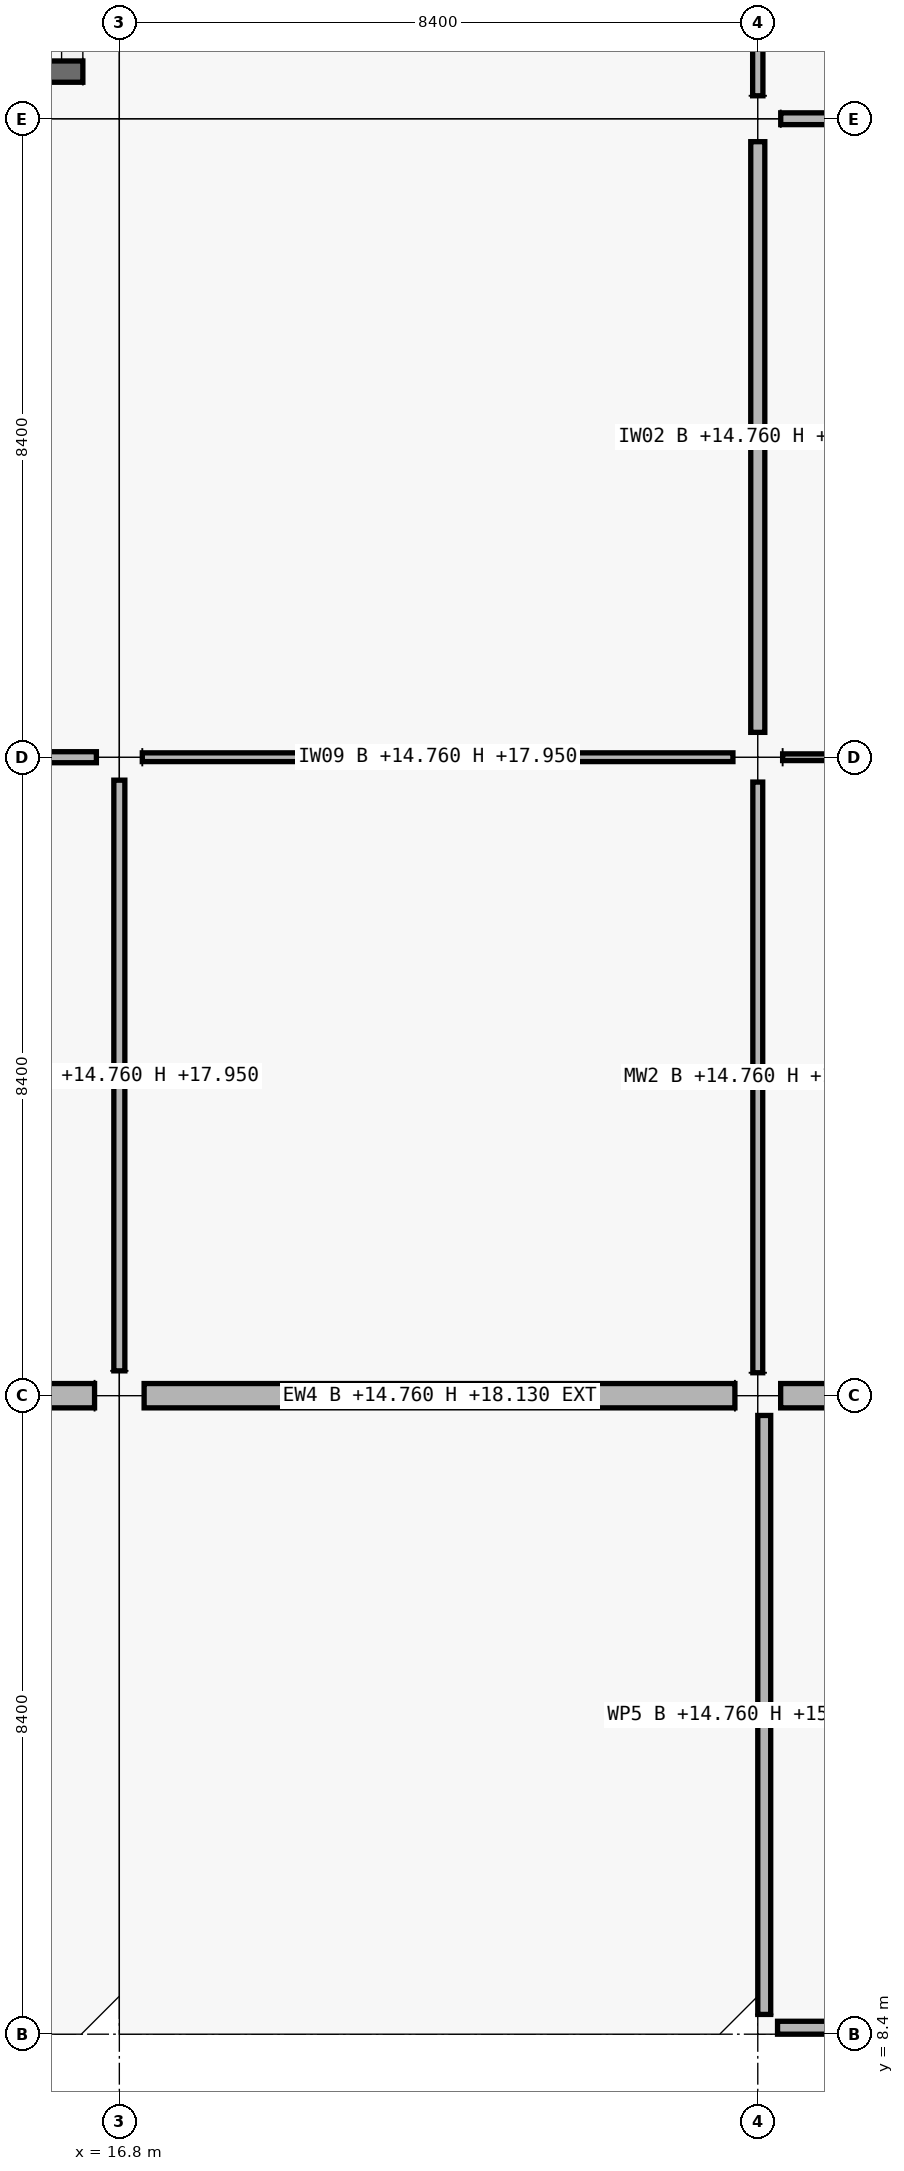
"""IFC4 building model, lengths in metres.
Left out: names, types, materials, properties, quantities, classifications, styles, units other than length and angle.
Written with IfcOpenShell. Run it as: python <this file> out.ifc"""

import sys

from ifc_helpers import new_model, si_unit, direction, frame, frame_2d, origin, origin_2d, place, context, subcontext, project, spatial, rectangle, extrude, element, fill, save


model = new_model("IFC4")
c1 = context("Model", 3, precision=1e-05, world=origin(), true_north=direction((0.0, 1.0)))
c2 = subcontext(c1, "Body", "Model", "MODEL_VIEW")
j1 = project(units=[si_unit("LENGTHUNIT", "METRE"), si_unit("PLANEANGLEUNIT", "RADIAN")], contexts=[c1])
p1 = place(None, origin())
s1 = spatial("IfcSite", under=j1, at=p1, CompositionType="ELEMENT")
p2 = place(p1, origin())
s2 = spatial("IfcBuilding", under=s1, at=p2, CompositionType="ELEMENT")
p3 = place(p2, frame((0.0, 0.0, 14.76)))
s3 = spatial("IfcBuildingStorey", under=s2, at=p3, CompositionType="ELEMENT", Elevation=14.76)
p4 = place(p3, frame((16.8, 16.8, 0.0), z_axis=(0.0, 0.0, 1.0), x_axis=(1.0, 0.0, 0.0)))
e1 = element("IfcColumn", 1, at=p4, inside=s3, PredefinedType="COLUMN", context=c2, shape_type="SweptSolid", body=[
    extrude(rectangle(XDim=0.65, YDim=0.65, at=origin_2d()), origin(), (0.0, 0.0, 1.0), 4.32),
])
p5 = place(p3, frame((16.8, 25.2, 0.0), z_axis=(0.0, 0.0, 1.0), x_axis=(1.0, 0.0, 0.0)))
e2 = element("IfcColumn", 2, at=p5, inside=s3, PredefinedType="COLUMN", context=c2, shape_type="SweptSolid", body=[
    extrude(rectangle(XDim=0.6, YDim=0.6, at=origin_2d()), origin(), (0.0, 0.0, 1.0), 4.32),
])
p6 = place(p3, frame((16.8, 33.6, 0.0), z_axis=(0.0, 0.0, 1.0), x_axis=(1.0, 0.0, 0.0)))
e3 = element("IfcColumn", 3, at=p6, inside=s3, PredefinedType="COLUMN", context=c2, shape_type="SweptSolid", body=[
    extrude(rectangle(XDim=0.65, YDim=0.65, at=origin_2d()), origin(), (0.0, 0.0, 1.0), 4.32),
])
p7 = place(p3, frame((25.2, 16.8, 0.0), z_axis=(0.0, 0.0, 1.0), x_axis=(1.0, 0.0, 0.0)))
e4 = element("IfcColumn", 4, at=p7, inside=s3, PredefinedType="COLUMN", context=c2, shape_type="SweptSolid", body=[
    extrude(rectangle(XDim=0.6, YDim=0.6, at=origin_2d()), origin(), (0.0, 0.0, 1.0), 4.32),
])
p8 = place(p3, frame((25.2, 25.2, 0.0), z_axis=(0.0, 0.0, 1.0), x_axis=(1.0, 0.0, 0.0)))
e5 = element("IfcColumn", 5, at=p8, inside=s3, PredefinedType="COLUMN", context=c2, shape_type="SweptSolid", body=[
    extrude(rectangle(XDim=0.65, YDim=0.65, at=origin_2d()), origin(), (0.0, 0.0, 1.0), 4.32),
])
p9 = place(p3, frame((25.2, 33.6, 0.0), z_axis=(0.0, 0.0, 1.0), x_axis=(1.0, 0.0, 0.0)))
e6 = element("IfcColumn", 6, at=p9, inside=s3, PredefinedType="COLUMN", context=c2, shape_type="SweptSolid", body=[
    extrude(rectangle(XDim=0.6, YDim=0.6, at=origin_2d()), origin(), (0.0, 0.0, 1.0), 4.32),
])
p10 = place(p3, frame((16.474, 16.8, 0.0), z_axis=(0.0, 0.0, 1.0), x_axis=(-1.0, 0.0, 0.0)))
e7 = element("IfcWall", 7, at=p10, inside=s3, PredefinedType="SOLIDWALL", context=c2, shape_type="SweptSolid", body=[
    extrude(rectangle(XDim=7.773, YDim=0.32, at=frame_2d((3.887, 0.0))), origin(), (0.0, 0.0, 1.0), 3.37),
])
p11 = place(p10, frame((2.962, 0.0, 0.0)))
e8 = element("IfcOpeningElement", 8, at=p11, cuts=e7, PredefinedType="OPENING", context=c2, shape_type="SweptSolid", body=[
    extrude(rectangle(XDim=1.85, YDim=2.2, at=frame_2d((0.925, 1.1))), frame((0.0, 0.16, 0.0), z_axis=(0.0, -1.0, 0.0), x_axis=(1.0, 0.0, 0.0)), (0.0, 0.0, 1.0), 0.32),
])
p12 = place(p3, frame((24.899, 16.8, 0.0), z_axis=(0.0, 0.0, 1.0), x_axis=(-1.0, 0.0, 0.0)))
e9 = element("IfcWall", 9, at=p12, inside=s3, PredefinedType="SOLIDWALL", context=c2, shape_type="SweptSolid", body=[
    extrude(rectangle(XDim=7.773, YDim=0.32, at=frame_2d((3.886, 0.0))), origin(), (0.0, 0.0, 1.0), 3.37),
])
p13 = place(p12, frame((3.061, 0.0, 0.0)))
e10 = element("IfcOpeningElement", 10, at=p13, cuts=e9, PredefinedType="OPENING", context=c2, shape_type="SweptSolid", body=[
    extrude(rectangle(XDim=1.65, YDim=2.2, at=frame_2d((0.825, 1.1))), frame((0.0, 0.16, 0.0), z_axis=(0.0, -1.0, 0.0), x_axis=(1.0, 0.0, 0.0)), (0.0, 0.0, 1.0), 0.32),
])
p14 = place(p3, frame((33.274, 16.8, 0.0), z_axis=(0.0, 0.0, 1.0), x_axis=(-1.0, 0.0, 0.0)))
e11 = element("IfcWall", 11, at=p14, inside=s3, PredefinedType="SOLIDWALL", context=c2, shape_type="SweptSolid", body=[
    extrude(rectangle(XDim=7.773, YDim=0.32, at=frame_2d((3.886, 0.0))), origin(), (0.0, 0.0, 1.0), 3.37),
])
p15 = place(p14, frame((2.786, 0.0, 0.9)))
e12 = element("IfcOpeningElement", 12, at=p15, cuts=e11, PredefinedType="OPENING", context=c2, shape_type="SweptSolid", body=[
    extrude(rectangle(XDim=2.2, YDim=1.75, at=frame_2d((1.1, 0.875))), frame((0.0, 0.16, 0.0), z_axis=(0.0, -1.0, 0.0), x_axis=(1.0, 0.0, 0.0)), (0.0, 0.0, 1.0), 0.32),
])
for number, where, z_axis, x_axis in (
    (13, (33.34, 8.485, 0.0), (0.0, 0.0, 1.0), (-1.0, 0.0, 0.0)),
    (14, (25.285, 8.66, 0.0), (0.0, 0.0, 1.0), (0.0, 1.0, 0.0)),
):
    element("IfcWall", number, at=place(p3, frame(where, z_axis=z_axis, x_axis=x_axis)), inside=s3, PredefinedType="PARAPET", context=c2, shape_type="SweptSolid", body=[
        extrude(rectangle(XDim=7.88, YDim=0.17, at=frame_2d((3.94, 0.0))), origin(), (0.0, 0.0, 1.0), 0.95),
    ])
p16 = place(p3, frame((16.32, 34.22, 0.0), z_axis=(0.0, 0.0, 1.0), x_axis=(-1.0, 0.0, 0.0)))
e15 = element("IfcWall", 15, at=p16, inside=s3, PredefinedType="SHEAR", context=c2, shape_type="SweptSolid", body=[
    extrude(rectangle(XDim=7.44, YDim=0.28, at=frame_2d((3.72, 0.0))), origin(), (0.0, 0.0, 1.0), 4.32),
])
p17 = place(p16, frame((1.28, 0.0, 0.0)))
e16 = element("IfcOpeningElement", 16, at=p17, cuts=e15, PredefinedType="OPENING", context=c2, shape_type="SweptSolid", body=[
    extrude(rectangle(XDim=1.5, YDim=2.15, at=frame_2d((0.75, 1.075))), frame((0.0, 0.14, 0.0), z_axis=(0.0, -1.0, 0.0), x_axis=(1.0, 0.0, 0.0)), (0.0, 0.0, 1.0), 0.28),
])
p18 = place(p3, frame((16.18, 41.24, 0.0), z_axis=(0.0, 0.0, 1.0), x_axis=(0.0, -1.0, 0.0)))
e17 = element("IfcWall", 17, at=p18, inside=s3, PredefinedType="SHEAR", context=c2, shape_type="SweptSolid", body=[
    extrude(rectangle(XDim=6.88, YDim=0.28, at=frame_2d((3.44, 0.0))), origin(), (0.0, 0.0, 1.0), 4.32),
])
p19 = place(p3, frame((8.727, 25.2, 0.0), z_axis=(0.0, 0.0, 1.0), x_axis=(1.0, 0.0, 0.0)))
e18 = element("IfcWall", 18, at=p19, inside=s3, PredefinedType="PARTITIONING", context=c2, shape_type="SweptSolid", body=[
    extrude(rectangle(XDim=7.771, YDim=0.145, at=frame_2d((3.885, 0.0))), origin(), (0.0, 0.0, 1.0), 3.19),
])
p20 = place(p19, frame((3.401, 0.0, 0.0)))
e19 = element("IfcOpeningElement", 19, at=p20, cuts=e18, PredefinedType="OPENING", context=c2, shape_type="SweptSolid", body=[
    extrude(rectangle(XDim=0.97, YDim=2.12, at=frame_2d((0.485, 1.06))), frame((0.0, 0.073, 0.0), z_axis=(0.0, -1.0, 0.0), x_axis=(1.0, 0.0, 0.0)), (0.0, 0.0, 1.0), 0.145),
])
p21 = place(p3, frame((17.102, 25.2, 0.0), z_axis=(0.0, 0.0, 1.0), x_axis=(1.0, 0.0, 0.0)))
e20 = element("IfcWall", 20, at=p21, inside=s3, PredefinedType="PARTITIONING", context=c2, shape_type="SweptSolid", body=[
    extrude(rectangle(XDim=7.771, YDim=0.115, at=frame_2d((3.885, 0.0))), origin(), (0.0, 0.0, 1.0), 3.19),
])
p22 = place(p21, frame((3.345, 0.0, 0.0)))
e21 = element("IfcOpeningElement", 21, at=p22, cuts=e20, PredefinedType="OPENING", context=c2, shape_type="SweptSolid", body=[
    extrude(rectangle(XDim=1.08, YDim=2.25, at=frame_2d((0.54, 1.125))), frame((0.0, 0.058, 0.0), z_axis=(0.0, -1.0, 0.0), x_axis=(1.0, 0.0, 0.0)), (0.0, 0.0, 1.0), 0.115),
])
p23 = place(p3, frame((25.527, 25.2, 0.0), z_axis=(0.0, 0.0, 1.0), x_axis=(1.0, 0.0, 0.0)))
e22 = element("IfcWall", 22, at=p23, inside=s3, PredefinedType="PARTITIONING", context=c2, shape_type="SweptSolid", body=[
    extrude(rectangle(XDim=7.771, YDim=0.088, at=frame_2d((3.885, 0.0))), origin(), (0.0, 0.0, 1.0), 3.19),
])
p24 = place(p23, frame((3.361, 0.0, 0.0)))
e23 = element("IfcOpeningElement", 23, at=p24, cuts=e22, PredefinedType="OPENING", context=c2, shape_type="SweptSolid", body=[
    extrude(rectangle(XDim=1.05, YDim=2.12, at=frame_2d((0.525, 1.06))), frame((0.0, 0.044, 0.0), z_axis=(0.0, -1.0, 0.0), x_axis=(1.0, 0.0, 0.0)), (0.0, 0.0, 1.0), 0.088),
])
p25 = place(p3, frame((25.502, 33.6, 0.0), z_axis=(0.0, 0.0, 1.0), x_axis=(1.0, 0.0, 0.0)))
e24 = element("IfcWall", 24, at=p25, inside=s3, PredefinedType="PARTITIONING", context=c2, shape_type="SweptSolid", body=[
    extrude(rectangle(XDim=7.771, YDim=0.155, at=frame_2d((3.885, 0.0))), origin(), (0.0, 0.0, 1.0), 3.19),
])
p26 = place(p25, frame((3.361, 0.0, 0.0)))
e25 = element("IfcOpeningElement", 25, at=p26, cuts=e24, PredefinedType="OPENING", context=c2, shape_type="SweptSolid", body=[
    extrude(rectangle(XDim=1.05, YDim=2.12, at=frame_2d((0.525, 1.06))), frame((0.0, 0.078, 0.0), z_axis=(0.0, -1.0, 0.0), x_axis=(1.0, 0.0, 0.0)), (0.0, 0.0, 1.0), 0.155),
])
p27 = place(p3, frame((16.8, 17.127, 0.0), z_axis=(0.0, 0.0, 1.0), x_axis=(0.0, 1.0, 0.0)))
e26 = element("IfcWall", 26, at=p27, inside=s3, PredefinedType="PARTITIONING", context=c2, shape_type="SweptSolid", body=[
    extrude(rectangle(XDim=7.771, YDim=0.145, at=frame_2d((3.885, 0.0))), origin(), (0.0, 0.0, 1.0), 3.19),
])
p28 = place(p27, frame((3.421, 0.0, 0.0)))
e27 = element("IfcOpeningElement", 27, at=p28, cuts=e26, PredefinedType="OPENING", context=c2, shape_type="SweptSolid", body=[
    extrude(rectangle(XDim=0.93, YDim=2.12, at=frame_2d((0.465, 1.06))), frame((0.0, 0.073, 0.0), z_axis=(0.0, -1.0, 0.0), x_axis=(1.0, 0.0, 0.0)), (0.0, 0.0, 1.0), 0.145),
])
p29 = place(p3, frame((25.2, 17.102, 0.0), z_axis=(0.0, 0.0, 1.0), x_axis=(0.0, 1.0, 0.0)))
e28 = element("IfcWall", 28, at=p29, inside=s3, PredefinedType="MOVABLE", context=c2, shape_type="SweptSolid", body=[
    extrude(rectangle(XDim=7.771, YDim=0.13, at=frame_2d((3.885, 0.0))), origin(), (0.0, 0.0, 1.0), 3.19),
])
p30 = place(p29, frame((3.345, 0.0, 0.0)))
e29 = element("IfcOpeningElement", 29, at=p30, cuts=e28, PredefinedType="OPENING", context=c2, shape_type="SweptSolid", body=[
    extrude(rectangle(XDim=1.08, YDim=2.25, at=frame_2d((0.54, 1.125))), frame((0.0, 0.065, 0.0), z_axis=(0.0, -1.0, 0.0), x_axis=(1.0, 0.0, 0.0)), (0.0, 0.0, 1.0), 0.13),
])
p31 = place(p3, frame((25.2, 25.527, 0.0), z_axis=(0.0, 0.0, 1.0), x_axis=(0.0, 1.0, 0.0)))
e30 = element("IfcWall", 30, at=p31, inside=s3, PredefinedType="PARTITIONING", context=c2, shape_type="SweptSolid", body=[
    extrude(rectangle(XDim=7.771, YDim=0.185, at=frame_2d((3.885, 0.0))), origin(), (0.0, 0.0, 1.0), 3.19),
])
p32 = place(p31, frame((3.365, 0.0, 0.0)))
e31 = element("IfcOpeningElement", 31, at=p32, cuts=e30, PredefinedType="OPENING", context=c2, shape_type="SweptSolid", body=[
    extrude(rectangle(XDim=1.04, YDim=2.2, at=frame_2d((0.52, 1.1))), frame((0.0, 0.093, 0.0), z_axis=(0.0, -1.0, 0.0), x_axis=(1.0, 0.0, 0.0)), (0.0, 0.0, 1.0), 0.185),
])
p33 = place(p3, frame((25.2, 33.902, 0.0), z_axis=(0.0, 0.0, 1.0), x_axis=(0.0, 1.0, 0.0)))
e32 = element("IfcWall", 32, at=p33, inside=s3, PredefinedType="PARTITIONING", context=c2, shape_type="SweptSolid", body=[
    extrude(rectangle(XDim=7.771, YDim=0.135, at=frame_2d((3.885, 0.0))), origin(), (0.0, 0.0, 1.0), 3.19),
])
p34 = place(p33, frame((3.375, 0.0, 0.0)))
e33 = element("IfcOpeningElement", 33, at=p34, cuts=e32, PredefinedType="OPENING", context=c2, shape_type="SweptSolid", body=[
    extrude(rectangle(XDim=1.02, YDim=2.2, at=frame_2d((0.51, 1.1))), frame((0.0, 0.067, 0.0), z_axis=(0.0, -1.0, 0.0), x_axis=(1.0, 0.0, 0.0)), (0.0, 0.0, 1.0), 0.135),
])
p35 = place(p13, origin())
e34 = element("IfcDoor", 34, at=p35, inside=s3, OperationType="DOUBLE_DOOR_SINGLE_SWING", PredefinedType="DOOR", context=c2, shape_type="SweptSolid", body=[
    extrude(rectangle(XDim=1.65, YDim=2.2, at=frame_2d((0.825, 1.1))), frame((0.0, 0.025, 0.0), z_axis=(0.0, -1.0, 0.0), x_axis=(1.0, 0.0, 0.0)), (0.0, 0.0, 1.0), 0.05),
])
fill(e10, e34)
p36 = place(p22, origin())
e35 = element("IfcDoor", 35, at=p36, inside=s3, OperationType="SINGLE_SWING_RIGHT", PredefinedType="DOOR", context=c2, shape_type="SweptSolid", body=[
    extrude(rectangle(XDim=1.08, YDim=2.25, at=frame_2d((0.54, 1.125))), frame((0.0, 0.025, 0.0), z_axis=(0.0, -1.0, 0.0), x_axis=(1.0, 0.0, 0.0)), (0.0, 0.0, 1.0), 0.05),
])
fill(e21, e35)
p37 = place(p32, origin())
e36 = element("IfcDoor", 36, at=p37, inside=s3, OperationType="SINGLE_SWING_LEFT", PredefinedType="DOOR", context=c2, shape_type="SweptSolid", body=[
    extrude(rectangle(XDim=1.04, YDim=2.2, at=frame_2d((0.52, 1.1))), frame((0.0, 0.025, 0.0), z_axis=(0.0, -1.0, 0.0), x_axis=(1.0, 0.0, 0.0)), (0.0, 0.0, 1.0), 0.05),
])
fill(e31, e36)
p38 = place(p28, origin())
e37 = element("IfcDoor", 37, at=p38, inside=s3, OperationType="SINGLE_SWING_RIGHT", PredefinedType="DOOR", context=c2, shape_type="SweptSolid", body=[
    extrude(rectangle(XDim=0.93, YDim=2.12, at=frame_2d((0.465, 1.06))), frame((0.0, 0.025, 0.0), z_axis=(0.0, -1.0, 0.0), x_axis=(1.0, 0.0, 0.0)), (0.0, 0.0, 1.0), 0.05),
])
fill(e27, e37)
p39 = place(p30, origin())
e38 = element("IfcDoor", 38, at=p39, inside=s3, OperationType="SINGLE_SWING_LEFT", PredefinedType="DOOR", context=c2, shape_type="SweptSolid", body=[
    extrude(rectangle(XDim=1.08, YDim=2.25, at=frame_2d((0.54, 1.125))), frame((0.0, 0.025, 0.0), z_axis=(0.0, -1.0, 0.0), x_axis=(1.0, 0.0, 0.0)), (0.0, 0.0, 1.0), 0.05),
])
fill(e29, e38)
save(model, sys.argv[1])
